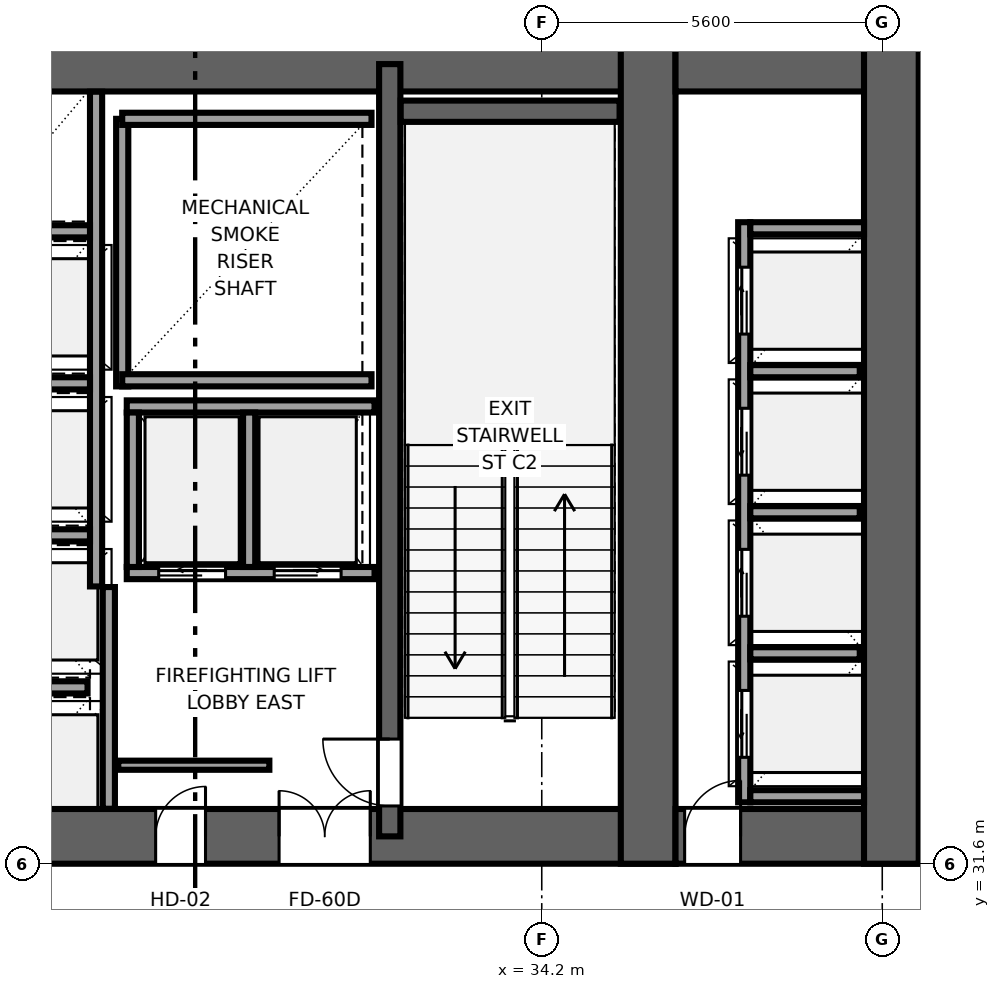
"""IFC4 building model, lengths in metres.
Left out: names, types, materials, properties, quantities, classifications, styles, units other than length and angle.
Written with IfcOpenShell. Run it as: python <this file> out.ifc"""

import sys

from ifc_helpers import new_model, si_unit, direction, frame, frame_2d, origin, place, context, subcontext, project, spatial, rectangle, extrude, source, transform, mapped, element, fill, save


model = new_model("IFC4")
c1 = context("Model", 3, precision=1e-05, world=origin(), true_north=direction((0.0, 1.0)))
c2 = subcontext(c1, "Body", "Model", "MODEL_VIEW")
j1 = project(units=[si_unit("LENGTHUNIT", "METRE"), si_unit("PLANEANGLEUNIT", "RADIAN")], contexts=[c1])
p1 = place(None, origin())
s1 = spatial("IfcSite", under=j1, at=p1, CompositionType="ELEMENT")
p2 = place(p1, origin())
s2 = spatial("IfcBuilding", under=s1, at=p2, CompositionType="ELEMENT")
p3 = place(p2, frame((0.0, 0.0, 26.8)))
s3 = spatial("IfcBuildingStorey", under=s2, at=p3, CompositionType="ELEMENT", Elevation=26.8)
p4 = place(p3, frame((9.6, 32.05, 0.0), z_axis=(0.0, 0.0, 1.0), x_axis=(1.0, 0.0, 0.0)))
e1 = element("IfcWall", 1, at=p4, inside=s3, PredefinedType="SHEAR", context=c2, shape_type="SweptSolid", body=[
    extrude(rectangle(XDim=26.8, YDim=0.9, at=frame_2d((13.4, 0.0))), origin(), (0.0, 0.0, 1.0), 5.2),
])
p5 = place(p4, frame((6.52, 0.0, 0.0), z_axis=(0.0, 0.0, 1.0), x_axis=(-1.0, 0.0, 0.0)))
e2 = element("IfcOpeningElement", 2, at=p5, cuts=e1, PredefinedType="OPENING", context=c2, shape_type="SweptSolid", body=[
    extrude(rectangle(XDim=1.5, YDim=2.04, at=frame_2d((0.75, 1.02))), frame((0.0, 0.46, 0.0), z_axis=(0.0, -1.0, 0.0), x_axis=(1.0, 0.0, 0.0)), (0.0, 0.0, 1.0), 0.92),
])
p6 = place(p4, frame((14.15, 0.0, 0.0), z_axis=(0.0, 0.0, 1.0), x_axis=(-1.0, 0.0, 0.0)))
e3 = element("IfcOpeningElement", 3, at=p6, cuts=e1, PredefinedType="OPENING", context=c2, shape_type="SweptSolid", body=[
    extrude(rectangle(XDim=1.5, YDim=2.04, at=frame_2d((0.75, 1.02))), frame((0.0, 0.46, 0.0), z_axis=(0.0, -1.0, 0.0), x_axis=(1.0, 0.0, 0.0)), (0.0, 0.0, 1.0), 0.92),
])
p7 = place(p4, frame((21.78, 0.0, 0.0), z_axis=(0.0, 0.0, 1.0), x_axis=(-1.0, 0.0, 0.0)))
e4 = element("IfcOpeningElement", 4, at=p7, cuts=e1, PredefinedType="OPENING", context=c2, shape_type="SweptSolid", body=[
    extrude(rectangle(XDim=1.5, YDim=2.04, at=frame_2d((0.75, 1.02))), frame((0.0, 0.46, 0.0), z_axis=(0.0, -1.0, 0.0), x_axis=(1.0, 0.0, 0.0)), (0.0, 0.0, 1.0), 0.92),
])
p8 = place(p4, frame((8.57, 0.0, 0.0), z_axis=(0.0, 0.0, 1.0), x_axis=(-1.0, 0.0, 0.0)))
e5 = element("IfcOpeningElement", 5, at=p8, cuts=e1, PredefinedType="OPENING", context=c2, shape_type="SweptSolid", body=[
    extrude(rectangle(XDim=0.82, YDim=2.01, at=frame_2d((0.41, 1.005))), frame((0.0, 0.46, 0.0), z_axis=(0.0, -1.0, 0.0), x_axis=(1.0, 0.0, 0.0)), (0.0, 0.0, 1.0), 0.92),
])
p9 = place(p4, frame((19.07, 0.0, 0.0), z_axis=(0.0, 0.0, 1.0), x_axis=(-1.0, 0.0, 0.0)))
e6 = element("IfcOpeningElement", 6, at=p9, cuts=e1, PredefinedType="OPENING", context=c2, shape_type="SweptSolid", body=[
    extrude(rectangle(XDim=0.82, YDim=2.01, at=frame_2d((0.41, 1.005))), frame((0.0, 0.46, 0.0), z_axis=(0.0, -1.0, 0.0), x_axis=(1.0, 0.0, 0.0)), (0.0, 0.0, 1.0), 0.92),
])
p10 = place(p3, frame((9.6, 44.75, 0.0), z_axis=(0.0, 0.0, 1.0), x_axis=(1.0, 0.0, 0.0)))
e7 = element("IfcWall", 7, at=p10, inside=s3, PredefinedType="SHEAR", context=c2, shape_type="SweptSolid", body=[
    extrude(rectangle(XDim=26.8, YDim=0.9, at=frame_2d((13.4, 0.0))), origin(), (0.0, 0.0, 1.0), 5.2),
])
p11 = place(p3, frame((35.95, 31.6, 0.0), z_axis=(0.0, 0.0, 1.0), x_axis=(0.0, 1.0, 0.0)))
e8 = element("IfcWall", 8, at=p11, inside=s3, PredefinedType="SHEAR", context=c2, shape_type="SweptSolid", body=[
    extrude(rectangle(XDim=13.6, YDim=0.9, at=frame_2d((6.8, 0.0))), origin(), (0.0, 0.0, 1.0), 5.2),
])
p12 = place(p3, frame((31.7, 32.05, 0.0), z_axis=(0.0, 0.0, 1.0), x_axis=(0.0, 1.0, 0.0)))
e9 = element("IfcWall", 9, at=p12, inside=s3, PredefinedType="SHEAR", context=c2, shape_type="SweptSolid", body=[
    extrude(rectangle(XDim=12.7, YDim=0.35, at=frame_2d((6.35, 0.0))), origin(), (0.0, 0.0, 1.0), 5.2),
])
p13 = place(p12, frame((1.6, 0.0, 0.0), z_axis=(0.0, 0.0, 1.0), x_axis=(-1.0, 0.0, 0.0)))
e10 = element("IfcOpeningElement", 10, at=p13, cuts=e9, PredefinedType="OPENING", context=c2, shape_type="SweptSolid", body=[
    extrude(rectangle(XDim=1.1, YDim=2.12, at=frame_2d((0.55, 1.06))), frame((0.0, 0.185, 0.0), z_axis=(0.0, -1.0, 0.0), x_axis=(1.0, 0.0, 0.0)), (0.0, 0.0, 1.0), 0.37),
])
p14 = place(p3, frame((36.4, 32.05, 0.0), z_axis=(0.0, 0.0, 1.0), x_axis=(1.0, 0.0, 0.0)))
e11 = element("IfcWall", 11, at=p14, inside=s3, PredefinedType="SHEAR", context=c2, shape_type="SweptSolid", body=[
    extrude(rectangle(XDim=4.0, YDim=0.9, at=frame_2d((2.0, 0.0))), origin(), (0.0, 0.0, 1.0), 5.2),
])
p15 = place(p14, frame((1.07, 0.0, 0.0), z_axis=(0.0, 0.0, 1.0), x_axis=(-1.0, 0.0, 0.0)))
e12 = element("IfcOpeningElement", 12, at=p15, cuts=e11, PredefinedType="OPENING", context=c2, shape_type="SweptSolid", body=[
    extrude(rectangle(XDim=0.92, YDim=2.01, at=frame_2d((0.46, 1.005))), frame((0.0, 0.46, 0.0), z_axis=(0.0, -1.0, 0.0), x_axis=(1.0, 0.0, 0.0)), (0.0, 0.0, 1.0), 0.92),
])
p16 = place(p3, frame((36.4, 44.75, 0.0), z_axis=(0.0, 0.0, 1.0), x_axis=(1.0, 0.0, 0.0)))
e13 = element("IfcWall", 13, at=p16, inside=s3, PredefinedType="SHEAR", context=c2, shape_type="SweptSolid", body=[
    extrude(rectangle(XDim=4.0, YDim=0.9, at=frame_2d((2.0, 0.0))), origin(), (0.0, 0.0, 1.0), 5.2),
])
p17 = place(p3, frame((39.95, 31.6, 0.0), z_axis=(0.0, 0.0, 1.0), x_axis=(0.0, 1.0, 0.0)))
e14 = element("IfcWall", 14, at=p17, inside=s3, PredefinedType="SHEAR", context=c2, shape_type="SweptSolid", body=[
    extrude(rectangle(XDim=13.6, YDim=0.9, at=frame_2d((6.8, 0.0))), origin(), (0.0, 0.0, 1.0), 5.2),
])
p18 = place(p3, frame((31.88, 43.975, 0.0), z_axis=(0.0, 0.0, 1.0), x_axis=(1.0, 0.0, 0.0)))
e15 = element("IfcWall", 15, at=p18, inside=s3, PredefinedType="SHEAR", context=c2, shape_type="SweptSolid", body=[
    extrude(rectangle(XDim=3.6, YDim=0.35, at=frame_2d((1.8, 0.0))), origin(), (0.0, 0.0, 1.0), 5.2),
])
p19 = place(p3, frame((27.3, 39.45, 0.0), z_axis=(0.0, 0.0, 1.0), x_axis=(0.0, 1.0, 0.0)))
e16 = element("IfcWall", 16, at=p19, inside=s3, PredefinedType="SOLIDWALL", context=c2, shape_type="SweptSolid", body=[
    extrude(rectangle(XDim=4.4, YDim=0.2, at=frame_2d((2.2, 0.0))), origin(), (0.0, 0.0, 1.0), 4.94),
])
for number, where, z_axis, x_axis in (
    (17, (27.3, 39.55, 0.0), (0.0, 0.0, 1.0), (1.0, 0.0, 0.0)),
    (18, (27.3, 43.85, 0.0), (0.0, 0.0, 1.0), (1.0, 0.0, 0.0)),
):
    element("IfcWall", number, at=place(p3, frame(where, z_axis=z_axis, x_axis=x_axis)), inside=s3, PredefinedType="SOLIDWALL", context=c2, shape_type="SweptSolid", body=[
        extrude(rectangle(XDim=4.1, YDim=0.2, at=frame_2d((2.05, 0.0))), origin(), (0.0, 0.0, 1.0), 4.94),
    ])
p20 = place(p3, frame((27.08, 32.504, 0.0), z_axis=(0.0, 0.0, 1.0), x_axis=(0.0, 1.0, 0.0)))
e19 = element("IfcWall", 19, at=p20, inside=s3, PredefinedType="SOLIDWALL", context=c2, shape_type="SweptSolid", body=[
    extrude(rectangle(XDim=3.646, YDim=0.2, at=frame_2d((1.823, 0.0))), origin(), (0.0, 0.0, 1.0), 4.94),
])
p21 = place(p3, frame((27.375, 36.38, 0.0), z_axis=(0.0, 0.0, 1.0), x_axis=(1.0, 0.0, 0.0)))
e20 = element("IfcWall", 20, at=p21, inside=s3, PredefinedType="SOLIDWALL", context=c2, shape_type="SweptSolid", body=[
    extrude(rectangle(XDim=4.075, YDim=0.2, at=frame_2d((2.038, 0.0))), origin(), (0.0, 0.0, 1.0), 4.94),
])
p22 = place(p21, frame((0.525, 0.0, 0.0)))
e21 = element("IfcOpeningElement", 21, at=p22, cuts=e20, PredefinedType="OPENING", context=c2, shape_type="SweptSolid", body=[
    extrude(rectangle(XDim=1.1, YDim=2.12, at=frame_2d((0.55, 1.06))), frame((0.0, 0.11, 0.0), z_axis=(0.0, -1.0, 0.0), x_axis=(1.0, 0.0, 0.0)), (0.0, 0.0, 1.0), 0.22),
])
p23 = place(p21, frame((2.425, 0.0, 0.0)))
e22 = element("IfcOpeningElement", 22, at=p23, cuts=e20, PredefinedType="OPENING", context=c2, shape_type="SweptSolid", body=[
    extrude(rectangle(XDim=1.1, YDim=2.12, at=frame_2d((0.55, 1.06))), frame((0.0, 0.11, 0.0), z_axis=(0.0, -1.0, 0.0), x_axis=(1.0, 0.0, 0.0)), (0.0, 0.0, 1.0), 0.22),
])
p24 = place(p3, frame((27.375, 39.12, 0.0), z_axis=(0.0, 0.0, 1.0), x_axis=(1.0, 0.0, 0.0)))
e23 = element("IfcWall", 23, at=p24, inside=s3, PredefinedType="SOLIDWALL", context=c2, shape_type="SweptSolid", body=[
    extrude(rectangle(XDim=4.075, YDim=0.2, at=frame_2d((2.038, 0.0))), origin(), (0.0, 0.0, 1.0), 4.94),
])
for number, where, z_axis, x_axis in (
    (24, (27.475, 36.48, 0.0), (0.0, 0.0, 1.0), (0.0, 1.0, 0.0)),
    (25, (29.387, 36.48, 0.0), (0.0, 0.0, 1.0), (0.0, 1.0, 0.0)),
):
    element("IfcWall", number, at=place(p3, frame(where, z_axis=z_axis, x_axis=x_axis)), inside=s3, PredefinedType="SOLIDWALL", context=c2, shape_type="SweptSolid", body=[
        extrude(rectangle(XDim=2.54, YDim=0.2, at=frame_2d((1.27, 0.0))), origin(), (0.0, 0.0, 1.0), 4.94),
    ])
p25 = place(p3, frame((26.87, 36.16, 0.0), z_axis=(0.0, 0.0, 1.0), x_axis=(0.0, 1.0, 0.0)))
e26 = element("IfcWall", 26, at=p25, inside=s3, PredefinedType="SOLIDWALL", context=c2, shape_type="SweptSolid", body=[
    extrude(rectangle(XDim=8.136, YDim=0.2, at=frame_2d((4.068, 0.0))), origin(), (0.0, 0.0, 1.0), 4.94),
])
p26 = place(p3, frame((24.93, 34.5, 0.0), z_axis=(0.0, 0.0, 1.0), x_axis=(1.0, 0.0, 0.0)))
e27 = element("IfcWall", 27, at=p26, inside=s3, PredefinedType="SOLIDWALL", context=c2, shape_type="SweptSolid", body=[
    extrude(rectangle(XDim=1.8, YDim=0.2, at=frame_2d((0.9, 0.0))), origin(), (0.0, 0.0, 1.0), 4.94),
])
for number, where, z_axis, x_axis in (
    (28, (24.93, 37.0, 0.0), (0.0, 0.0, 1.0), (1.0, 0.0, 0.0)),
    (29, (24.93, 39.5, 0.0), (0.0, 0.0, 1.0), (1.0, 0.0, 0.0)),
    (30, (24.93, 42.0, 0.0), (0.0, 0.0, 1.0), (1.0, 0.0, 0.0)),
):
    element("IfcWall", number, at=place(p3, frame(where, z_axis=z_axis, x_axis=x_axis)), inside=s3, PredefinedType="SOLIDWALL", context=c2, shape_type="SweptSolid", body=[
        extrude(rectangle(XDim=1.84, YDim=0.2, at=frame_2d((0.92, 0.0))), origin(), (0.0, 0.0, 1.0), 4.94),
    ])
p27 = place(p3, frame((37.53, 32.61, 0.0), z_axis=(0.0, 0.0, 1.0), x_axis=(0.0, 1.0, 0.0)))
e31 = element("IfcWall", 31, at=p27, inside=s3, PredefinedType="SOLIDWALL", context=c2, shape_type="SweptSolid", body=[
    extrude(rectangle(XDim=9.54, YDim=0.2, at=frame_2d((4.77, 0.0))), origin(), (0.0, 0.0, 1.0), 4.94),
])
p28 = place(p27, frame((0.74, 0.0, 0.0)))
e32 = element("IfcOpeningElement", 32, at=p28, cuts=e31, PredefinedType="OPENING", context=c2, shape_type="SweptSolid", body=[
    extrude(rectangle(XDim=1.1, YDim=2.12, at=frame_2d((0.55, 1.06))), frame((0.0, 0.11, 0.0), z_axis=(0.0, -1.0, 0.0), x_axis=(1.0, 0.0, 0.0)), (0.0, 0.0, 1.0), 0.22),
])
p29 = place(p27, frame((3.06, 0.0, 0.0)))
e33 = element("IfcOpeningElement", 33, at=p29, cuts=e31, PredefinedType="OPENING", context=c2, shape_type="SweptSolid", body=[
    extrude(rectangle(XDim=1.1, YDim=2.12, at=frame_2d((0.55, 1.06))), frame((0.0, 0.11, 0.0), z_axis=(0.0, -1.0, 0.0), x_axis=(1.0, 0.0, 0.0)), (0.0, 0.0, 1.0), 0.22),
])
p30 = place(p27, frame((5.38, 0.0, 0.0)))
e34 = element("IfcOpeningElement", 34, at=p30, cuts=e31, PredefinedType="OPENING", context=c2, shape_type="SweptSolid", body=[
    extrude(rectangle(XDim=1.1, YDim=2.12, at=frame_2d((0.55, 1.06))), frame((0.0, 0.11, 0.0), z_axis=(0.0, -1.0, 0.0), x_axis=(1.0, 0.0, 0.0)), (0.0, 0.0, 1.0), 0.22),
])
p31 = place(p27, frame((7.7, 0.0, 0.0)))
e35 = element("IfcOpeningElement", 35, at=p31, cuts=e31, PredefinedType="OPENING", context=c2, shape_type="SweptSolid", body=[
    extrude(rectangle(XDim=1.1, YDim=2.12, at=frame_2d((0.55, 1.06))), frame((0.0, 0.11, 0.0), z_axis=(0.0, -1.0, 0.0), x_axis=(1.0, 0.0, 0.0)), (0.0, 0.0, 1.0), 0.22),
])
for number, where, z_axis, x_axis in (
    (36, (37.63, 32.71, 0.0), (0.0, 0.0, 1.0), (1.0, 0.0, 0.0)),
    (37, (37.63, 42.05, 0.0), (0.0, 0.0, 1.0), (1.0, 0.0, 0.0)),
):
    element("IfcWall", number, at=place(p3, frame(where, z_axis=z_axis, x_axis=x_axis)), inside=s3, PredefinedType="SOLIDWALL", context=c2, shape_type="SweptSolid", body=[
        extrude(rectangle(XDim=1.87, YDim=0.2, at=frame_2d((0.935, 0.0))), origin(), (0.0, 0.0, 1.0), 4.94),
    ])
for number, where, z_axis, x_axis in (
    (38, (37.63, 35.06, 0.0), (0.0, 0.0, 1.0), (1.0, 0.0, 0.0)),
    (39, (37.63, 37.38, 0.0), (0.0, 0.0, 1.0), (1.0, 0.0, 0.0)),
    (40, (37.63, 39.7, 0.0), (0.0, 0.0, 1.0), (1.0, 0.0, 0.0)),
):
    element("IfcWall", number, at=place(p3, frame(where, z_axis=z_axis, x_axis=x_axis)), inside=s3, PredefinedType="SOLIDWALL", context=c2, shape_type="SweptSolid", body=[
        extrude(rectangle(XDim=1.8, YDim=0.2, at=frame_2d((0.9, 0.0))), origin(), (0.0, 0.0, 1.0), 4.94),
    ])
p32 = place(p3, frame((27.235, 33.22, 0.0), z_axis=(0.0, 0.0, 1.0), x_axis=(1.0, 0.0, 0.0)))
e41 = element("IfcWall", 41, at=p32, inside=s3, PredefinedType="PARTITIONING", context=c2, shape_type="SweptSolid", body=[
    extrude(rectangle(XDim=2.485, YDim=0.15, at=frame_2d((1.242, 0.0))), origin(), (0.0, 0.0, 1.0), 4.94),
])
m1 = source(origin(), c2, "Body", "SweptSolid", [
    extrude(rectangle(XDim=1.1, YDim=2.12, at=frame_2d((0.55, 1.06))), frame((0.0, 0.025, 0.0), z_axis=(0.0, -1.0, 0.0), x_axis=(1.0, 0.0, 0.0)), (0.0, 0.0, 1.0), 0.05),
])
p33 = place(p13, origin())
e42 = element("IfcDoor", 42, at=p33, inside=s3, OperationType="SINGLE_SWING_RIGHT", PredefinedType="DOOR", context=c2, shape_type="MappedRepresentation", body=[
    mapped(m1, transform((0.0, 0.0, 0.0), x_axis=(1.0, 0.0, 0.0), y_axis=(0.0, 1.0, 0.0), z_axis=(0.0, 0.0, 1.0), scale=1.0)),
])
fill(e10, e42)
m2 = source(origin(), c2, "Body", "SweptSolid", [
    extrude(rectangle(XDim=1.5, YDim=2.04, at=frame_2d((0.75, 1.02))), frame((0.0, 0.025, 0.0), z_axis=(0.0, -1.0, 0.0), x_axis=(1.0, 0.0, 0.0)), (0.0, 0.0, 1.0), 0.05),
])
p34 = place(p7, origin())
e43 = element("IfcDoor", 43, at=p34, inside=s3, OperationType="DOUBLE_DOOR_SINGLE_SWING", PredefinedType="DOOR", context=c2, shape_type="MappedRepresentation", body=[
    mapped(m2, transform((0.0, 0.0, 0.0), x_axis=(1.0, 0.0, 0.0), y_axis=(0.0, 1.0, 0.0), z_axis=(0.0, 0.0, 1.0), scale=1.0)),
])
fill(e4, e43)
m3 = source(origin(), c2, "Body", "SweptSolid", [
    extrude(rectangle(XDim=0.82, YDim=2.01, at=frame_2d((0.41, 1.005))), frame((0.0, 0.025, 0.0), z_axis=(0.0, -1.0, 0.0), x_axis=(1.0, 0.0, 0.0)), (0.0, 0.0, 1.0), 0.05),
])
p35 = place(p9, origin())
e44 = element("IfcDoor", 44, at=p35, inside=s3, OperationType="SINGLE_SWING_RIGHT", PredefinedType="DOOR", context=c2, shape_type="MappedRepresentation", body=[
    mapped(m3, transform((0.0, 0.0, 0.0), x_axis=(1.0, 0.0, 0.0), y_axis=(0.0, 1.0, 0.0), z_axis=(0.0, 0.0, 1.0), scale=1.0)),
])
fill(e6, e44)
m4 = source(origin(), c2, "Body", "SweptSolid", [
    extrude(rectangle(XDim=0.92, YDim=2.01, at=frame_2d((0.46, 1.005))), frame((0.0, 0.025, 0.0), z_axis=(0.0, -1.0, 0.0), x_axis=(1.0, 0.0, 0.0)), (0.0, 0.0, 1.0), 0.05),
])
p36 = place(p15, origin())
e45 = element("IfcDoor", 45, at=p36, inside=s3, OperationType="SINGLE_SWING_RIGHT", PredefinedType="DOOR", context=c2, shape_type="MappedRepresentation", body=[
    mapped(m4, transform((0.0, 0.0, 0.0), x_axis=(1.0, 0.0, 0.0), y_axis=(0.0, 1.0, 0.0), z_axis=(0.0, 0.0, 1.0), scale=1.0)),
])
fill(e12, e45)
m5 = source(origin(), c2, "Body", "SweptSolid", [
    extrude(rectangle(XDim=1.1, YDim=2.12, at=frame_2d((0.55, 1.06))), frame((0.0, 0.025, 0.0), z_axis=(0.0, -1.0, 0.0), x_axis=(1.0, 0.0, 0.0)), (0.0, 0.0, 1.0), 0.05),
])
p37 = place(p22, origin())
e46 = element("IfcDoor", 46, at=p37, inside=s3, OperationType="SLIDING_TO_LEFT", PredefinedType="DOOR", context=c2, shape_type="MappedRepresentation", body=[
    mapped(m5, transform((0.0, 0.0, 0.0), x_axis=(1.0, 0.0, 0.0), y_axis=(0.0, 1.0, 0.0), z_axis=(0.0, 0.0, 1.0), scale=1.0)),
])
fill(e21, e46)
p38 = place(p23, origin())
e47 = element("IfcDoor", 47, at=p38, inside=s3, OperationType="SLIDING_TO_RIGHT", PredefinedType="DOOR", context=c2, shape_type="MappedRepresentation", body=[
    mapped(m5, transform((0.0, 0.0, 0.0), x_axis=(1.0, 0.0, 0.0), y_axis=(0.0, 1.0, 0.0), z_axis=(0.0, 0.0, 1.0), scale=1.0)),
])
fill(e22, e47)
p39 = place(p28, origin())
e48 = element("IfcDoor", 48, at=p39, inside=s3, OperationType="SLIDING_TO_LEFT", PredefinedType="DOOR", context=c2, shape_type="MappedRepresentation", body=[
    mapped(m5, transform((0.0, 0.0, 0.0), x_axis=(1.0, 0.0, 0.0), y_axis=(0.0, 1.0, 0.0), z_axis=(0.0, 0.0, 1.0), scale=1.0)),
])
fill(e32, e48)
p40 = place(p29, origin())
e49 = element("IfcDoor", 49, at=p40, inside=s3, OperationType="SLIDING_TO_RIGHT", PredefinedType="DOOR", context=c2, shape_type="MappedRepresentation", body=[
    mapped(m5, transform((0.0, 0.0, 0.0), x_axis=(1.0, 0.0, 0.0), y_axis=(0.0, 1.0, 0.0), z_axis=(0.0, 0.0, 1.0), scale=1.0)),
])
fill(e33, e49)
p41 = place(p30, origin())
e50 = element("IfcDoor", 50, at=p41, inside=s3, OperationType="SLIDING_TO_LEFT", PredefinedType="DOOR", context=c2, shape_type="MappedRepresentation", body=[
    mapped(m5, transform((0.0, 0.0, 0.0), x_axis=(1.0, 0.0, 0.0), y_axis=(0.0, 1.0, 0.0), z_axis=(0.0, 0.0, 1.0), scale=1.0)),
])
fill(e34, e50)
p42 = place(p31, origin())
e51 = element("IfcDoor", 51, at=p42, inside=s3, OperationType="SLIDING_TO_RIGHT", PredefinedType="DOOR", context=c2, shape_type="MappedRepresentation", body=[
    mapped(m5, transform((0.0, 0.0, 0.0), x_axis=(1.0, 0.0, 0.0), y_axis=(0.0, 1.0, 0.0), z_axis=(0.0, 0.0, 1.0), scale=1.0)),
])
fill(e35, e51)
save(model, sys.argv[1])
